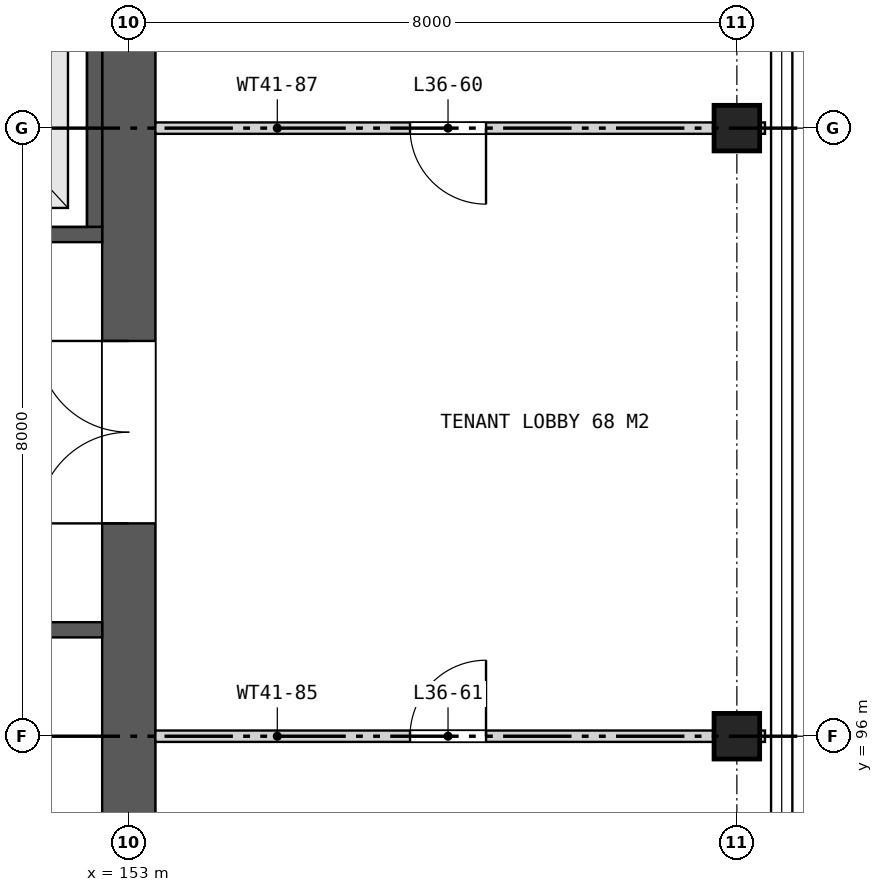
"""IFC4 building model, lengths in metres.
Left out: names, types, materials, properties, quantities, classifications, styles, units other than length and angle.
Written with IfcOpenShell. Run it as: python <this file> out.ifc"""

import sys

from ifc_helpers import new_model, si_unit, direction, frame, frame_2d, origin, origin_2d, place, context, subcontext, project, spatial, rectangle, extrude, element, fill, save


model = new_model("IFC4")
c1 = context("Model", 3, precision=1e-05, world=origin(), true_north=direction((0.0, 1.0)))
c2 = subcontext(c1, "Body", "Model", "MODEL_VIEW")
j1 = project(units=[si_unit("LENGTHUNIT", "METRE"), si_unit("PLANEANGLEUNIT", "RADIAN")], contexts=[c1])
p1 = place(None, origin())
s1 = spatial("IfcSite", under=j1, at=p1, CompositionType="ELEMENT")
p2 = place(p1, origin())
s2 = spatial("IfcBuilding", under=s1, at=p2, CompositionType="ELEMENT")
p3 = place(p2, frame((0.0, 0.0, 171.5)))
s3 = spatial("IfcBuildingStorey", under=s2, at=p3, CompositionType="ELEMENT", Elevation=171.5)
for number, where, z_axis, x_axis in (
    (1, (161.0, 96.0, 0.0), (0.0, 0.0, 1.0), (1.0, 0.0, 0.0)),
    (2, (161.0, 104.0, 0.0), (0.0, 0.0, 1.0), (1.0, 0.0, 0.0)),
):
    element("IfcColumn", number, at=place(p3, frame(where, z_axis=z_axis, x_axis=x_axis)), inside=s3, PredefinedType="COLUMN", context=c2, shape_type="SweptSolid", body=[
        extrude(rectangle(XDim=0.6, YDim=0.6, at=origin_2d()), origin(), (0.0, 0.0, 1.0), 7.4),
    ])
p4 = place(p3, frame((153.0, 88.35, 0.0), z_axis=(0.0, 0.0, 1.0), x_axis=(0.0, 1.0, 0.0)))
e3 = element("IfcWall", 3, at=p4, inside=s3, PredefinedType="SHEAR", context=c2, shape_type="SweptSolid", body=[
    extrude(rectangle(XDim=23.3, YDim=0.7, at=frame_2d((11.65, 0.0))), origin(), (0.0, 0.0, 1.0), 7.4),
])
p5 = place(p4, frame((10.45, 0.0, 0.0)))
e4 = element("IfcOpeningElement", 4, at=p5, cuts=e3, PredefinedType="OPENING", context=c2, shape_type="SweptSolid", body=[
    extrude(rectangle(XDim=2.4, YDim=2.4, at=frame_2d((1.2, 1.2))), frame((0.0, 0.36, 0.0), z_axis=(0.0, -1.0, 0.0), x_axis=(1.0, 0.0, 0.0)), (0.0, 0.0, 1.0), 0.72),
])
p6 = place(p3, frame((152.55, 102.7, 0.0), z_axis=(0.0, 0.0, 1.0), x_axis=(0.0, 1.0, 0.0)))
e5 = element("IfcWall", 5, at=p6, inside=s3, PredefinedType="SHEAR", context=c2, shape_type="SweptSolid", body=[
    extrude(rectangle(XDim=3.0, YDim=0.2, at=frame_2d((1.5, 0.0))), origin(), (0.0, 0.0, 1.0), 7.4),
])
p7 = place(p3, frame((140.6, 102.6, 0.0), z_axis=(0.0, 0.0, 1.0), x_axis=(1.0, 0.0, 0.0)))
e6 = element("IfcWall", 6, at=p7, inside=s3, PredefinedType="SHEAR", context=c2, shape_type="SweptSolid", body=[
    extrude(rectangle(XDim=12.05, YDim=0.2, at=frame_2d((6.025, 0.0))), origin(), (0.0, 0.0, 1.0), 7.4),
])
p8 = place(p7, frame((0.85, 0.0, 0.0)))
e7 = element("IfcOpeningElement", 7, at=p8, cuts=e6, PredefinedType="OPENING", context=c2, shape_type="SweptSolid", body=[
    extrude(rectangle(XDim=1.4, YDim=2.1, at=frame_2d((0.7, 1.05))), frame((0.0, 0.11, 0.0), z_axis=(0.0, -1.0, 0.0), x_axis=(1.0, 0.0, 0.0)), (0.0, 0.0, 1.0), 0.22),
])
p9 = place(p7, frame((3.8, 0.0, 0.0)))
e8 = element("IfcOpeningElement", 8, at=p9, cuts=e6, PredefinedType="OPENING", context=c2, shape_type="SweptSolid", body=[
    extrude(rectangle(XDim=1.4, YDim=2.1, at=frame_2d((0.7, 1.05))), frame((0.0, 0.11, 0.0), z_axis=(0.0, -1.0, 0.0), x_axis=(1.0, 0.0, 0.0)), (0.0, 0.0, 1.0), 0.22),
])
p10 = place(p7, frame((6.8, 0.0, 0.0)))
e9 = element("IfcOpeningElement", 9, at=p10, cuts=e6, PredefinedType="OPENING", context=c2, shape_type="SweptSolid", body=[
    extrude(rectangle(XDim=1.4, YDim=2.1, at=frame_2d((0.7, 1.05))), frame((0.0, 0.11, 0.0), z_axis=(0.0, -1.0, 0.0), x_axis=(1.0, 0.0, 0.0)), (0.0, 0.0, 1.0), 0.22),
])
p11 = place(p7, frame((9.775, 0.0, 0.0)))
e10 = element("IfcOpeningElement", 10, at=p11, cuts=e6, PredefinedType="OPENING", context=c2, shape_type="SweptSolid", body=[
    extrude(rectangle(XDim=1.4, YDim=2.1, at=frame_2d((0.7, 1.05))), frame((0.0, 0.11, 0.0), z_axis=(0.0, -1.0, 0.0), x_axis=(1.0, 0.0, 0.0)), (0.0, 0.0, 1.0), 0.22),
])
p12 = place(p3, frame((140.6, 97.4, 0.0), z_axis=(0.0, 0.0, 1.0), x_axis=(1.0, 0.0, 0.0)))
e11 = element("IfcWall", 11, at=p12, inside=s3, PredefinedType="SHEAR", context=c2, shape_type="SweptSolid", body=[
    extrude(rectangle(XDim=12.05, YDim=0.2, at=frame_2d((6.025, 0.0))), origin(), (0.0, 0.0, 1.0), 7.4),
])
p13 = place(p12, frame((0.607, 0.0, 0.0)))
e12 = element("IfcOpeningElement", 12, at=p13, cuts=e11, PredefinedType="OPENING", context=c2, shape_type="SweptSolid", body=[
    extrude(rectangle(XDim=0.9, YDim=2.1, at=frame_2d((0.45, 1.05))), frame((0.0, 0.11, 0.0), z_axis=(0.0, -1.0, 0.0), x_axis=(1.0, 0.0, 0.0)), (0.0, 0.0, 1.0), 0.22),
])
p14 = place(p12, frame((4.786, 0.0, 0.0)))
e13 = element("IfcOpeningElement", 13, at=p14, cuts=e11, PredefinedType="OPENING", context=c2, shape_type="SweptSolid", body=[
    extrude(rectangle(XDim=0.9, YDim=2.1, at=frame_2d((0.45, 1.05))), frame((0.0, 0.11, 0.0), z_axis=(0.0, -1.0, 0.0), x_axis=(1.0, 0.0, 0.0)), (0.0, 0.0, 1.0), 0.22),
])
p15 = place(p12, frame((9.854, 0.0, 0.0)))
e14 = element("IfcOpeningElement", 14, at=p15, cuts=e11, PredefinedType="OPENING", context=c2, shape_type="SweptSolid", body=[
    extrude(rectangle(XDim=0.9, YDim=2.1, at=frame_2d((0.45, 1.05))), frame((0.0, 0.11, 0.0), z_axis=(0.0, -1.0, 0.0), x_axis=(1.0, 0.0, 0.0)), (0.0, 0.0, 1.0), 0.22),
])
p16 = place(p3, frame((153.35, 96.0, 0.0), z_axis=(0.0, 0.0, 1.0), x_axis=(1.0, 0.0, 0.0)))
e15 = element("IfcWall", 15, at=p16, inside=s3, PredefinedType="PARTITIONING", context=c2, shape_type="SweptSolid", body=[
    extrude(rectangle(XDim=8.02, YDim=0.15, at=frame_2d((4.01, 0.0))), origin(), (0.0, 0.0, 1.0), 6.64),
])
p17 = place(p16, frame((3.35, 0.0, 0.0)))
e16 = element("IfcOpeningElement", 16, at=p17, cuts=e15, PredefinedType="OPENING", context=c2, shape_type="SweptSolid", body=[
    extrude(rectangle(XDim=1.0, YDim=2.1, at=frame_2d((0.5, 1.05))), frame((0.0, 0.085, 0.0), z_axis=(0.0, -1.0, 0.0), x_axis=(1.0, 0.0, 0.0)), (0.0, 0.0, 1.0), 0.17),
])
p18 = place(p3, frame((153.35, 104.0, 0.0), z_axis=(0.0, 0.0, 1.0), x_axis=(1.0, 0.0, 0.0)))
e17 = element("IfcWall", 17, at=p18, inside=s3, PredefinedType="PARTITIONING", context=c2, shape_type="SweptSolid", body=[
    extrude(rectangle(XDim=8.02, YDim=0.15, at=frame_2d((4.01, 0.0))), origin(), (0.0, 0.0, 1.0), 6.64),
])
p19 = place(p18, frame((3.35, 0.0, 0.0)))
e18 = element("IfcOpeningElement", 18, at=p19, cuts=e17, PredefinedType="OPENING", context=c2, shape_type="SweptSolid", body=[
    extrude(rectangle(XDim=1.0, YDim=2.1, at=frame_2d((0.5, 1.05))), frame((0.0, 0.085, 0.0), z_axis=(0.0, -1.0, 0.0), x_axis=(1.0, 0.0, 0.0)), (0.0, 0.0, 1.0), 0.17),
])
p20 = place(p5, origin())
e19 = element("IfcDoor", 19, at=p20, inside=s3, OperationType="DOUBLE_DOOR_SINGLE_SWING", PredefinedType="DOOR", context=c2, shape_type="SweptSolid", body=[
    extrude(rectangle(XDim=2.4, YDim=2.4, at=frame_2d((1.2, 1.2))), frame((0.0, 0.025, 0.0), z_axis=(0.0, -1.0, 0.0), x_axis=(1.0, 0.0, 0.0)), (0.0, 0.0, 1.0), 0.05),
])
fill(e4, e19)
p21 = place(p19, frame((1.0, 0.0, 0.0), z_axis=(0.0, 0.0, 1.0), x_axis=(-1.0, 0.0, 0.0)))
e20 = element("IfcDoor", 20, at=p21, inside=s3, OperationType="SINGLE_SWING_LEFT", PredefinedType="DOOR", context=c2, shape_type="SweptSolid", body=[
    extrude(rectangle(XDim=1.0, YDim=2.1, at=frame_2d((0.5, 1.05))), frame((0.0, 0.025, 0.0), z_axis=(0.0, -1.0, 0.0), x_axis=(1.0, 0.0, 0.0)), (0.0, 0.0, 1.0), 0.05),
])
fill(e18, e20)
p22 = place(p17, origin())
e21 = element("IfcDoor", 21, at=p22, inside=s3, OperationType="SINGLE_SWING_RIGHT", PredefinedType="DOOR", context=c2, shape_type="SweptSolid", body=[
    extrude(rectangle(XDim=1.0, YDim=2.1, at=frame_2d((0.5, 1.05))), frame((0.0, 0.025, 0.0), z_axis=(0.0, -1.0, 0.0), x_axis=(1.0, 0.0, 0.0)), (0.0, 0.0, 1.0), 0.05),
])
fill(e16, e21)
save(model, sys.argv[1])
